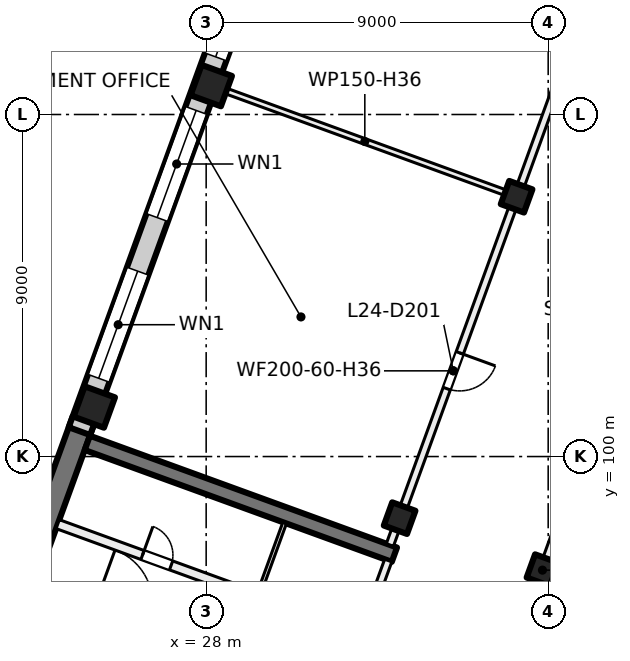
"""IFC4 building model, lengths in metres.
Left out: names, types, materials, properties, quantities, classifications, styles, units other than length and angle.
Written with IfcOpenShell. Run it as: python <this file> out.ifc"""

import sys

from ifc_helpers import new_model, si_unit, direction, frame, frame_2d, origin, origin_2d, place, context, subcontext, project, spatial, rectangle, extrude, element, fill, save


model = new_model("IFC4")
c1 = context("Model", 3, precision=1e-05, world=origin(), true_north=direction((0.0, 1.0)))
c2 = subcontext(c1, "Body", "Model", "MODEL_VIEW")
j1 = project(units=[si_unit("LENGTHUNIT", "METRE"), si_unit("PLANEANGLEUNIT", "RADIAN")], contexts=[c1])
p1 = place(None, origin())
s1 = spatial("IfcSite", under=j1, at=p1, CompositionType="ELEMENT")
p2 = place(p1, origin())
s2 = spatial("IfcBuilding", under=s1, at=p2, CompositionType="ELEMENT")
p3 = place(p2, frame((0.0, 0.0, 105.0)))
s3 = spatial("IfcBuildingStorey", under=s2, at=p3, CompositionType="ELEMENT", Elevation=105.0)
for number, where, z_axis, x_axis in (
    (1, (36.849, 97.011, 0.0), (0.0, 0.0, 1.0), (-0.342, -0.94, 0.0)),
    (2, (36.169, 106.836, 0.0), (0.0, 0.0, 1.0), (-0.342, -0.94, 0.0)),
    (3, (33.091, 98.379, 0.0), (0.0, 0.0, 1.0), (-0.342, -0.94, 0.0)),
):
    element("IfcColumn", number, at=place(p3, frame(where, z_axis=z_axis, x_axis=x_axis)), inside=s3, PredefinedType="COLUMN", context=c2, shape_type="SweptSolid", body=[
        extrude(rectangle(XDim=0.65, YDim=0.65, at=origin_2d()), origin(), (0.0, 0.0, 1.0), 4.0),
    ])
for number, where, z_axis, x_axis in (
    (4, (28.134, 109.76, 0.0), (0.0, 0.0, 1.0), (-0.342, -0.94, 0.0)),
    (5, (25.056, 101.303, 0.0), (0.0, 0.0, 1.0), (-0.342, -0.94, 0.0)),
):
    element("IfcColumn", number, at=place(p3, frame(where, z_axis=z_axis, x_axis=x_axis)), inside=s3, PredefinedType="COLUMN", context=c2, shape_type="SweptSolid", body=[
        extrude(rectangle(XDim=0.85, YDim=0.85, at=origin_2d()), origin(), (0.0, 0.0, 1.0), 4.0),
    ])
p4 = place(p3, frame((21.717, 92.568, 0.0), z_axis=(0.0, 0.0, 1.0), x_axis=(0.342017595281, 0.939693548195, 0.0)))
e6 = element("IfcWall", 6, at=p4, inside=s3, PredefinedType="SHEAR", context=c2, shape_type="SweptSolid", body=[
    extrude(rectangle(XDim=8.925, YDim=0.6, at=frame_2d((4.462, 0.0))), origin(), (0.0, 0.0, 1.0), 4.0),
])
p5 = place(p3, frame((32.953, 97.418, 0.0), z_axis=(0.0, 0.0, 1.0), x_axis=(-0.93969060187, 0.342025690201, 0.0)))
e7 = element("IfcWall", 7, at=p5, inside=s3, PredefinedType="SHEAR", context=c2, shape_type="SweptSolid", body=[
    extrude(rectangle(XDim=8.6, YDim=0.4, at=frame_2d((4.3, 0.0))), origin(), (0.0, 0.0, 1.0), 4.0),
])
p6 = place(p3, frame((24.666, 100.669, 0.0), z_axis=(0.0, 0.0, 1.0), x_axis=(0.34201964167, 0.939692803373, 0.0)))
e8 = element("IfcWall", 8, at=p6, inside=s3, PredefinedType="SOLIDWALL", context=c2, shape_type="SweptSolid", body=[
    extrude(rectangle(XDim=32.884, YDim=0.6, at=frame_2d((16.442, 0.0))), origin(), (0.0, 0.0, 1.0), 3.625),
])
p7 = place(p6, frame((1.48, 0.0, 0.9)))
e9 = element("IfcOpeningElement", 9, at=p7, cuts=e8, PredefinedType="OPENING", context=c2, shape_type="SweptSolid", body=[
    extrude(rectangle(XDim=3.0, YDim=2.4, at=frame_2d((1.5, 1.2))), frame((0.0, 0.31, 0.0), z_axis=(0.0, -1.0, 0.0), x_axis=(1.0, 0.0, 0.0)), (0.0, 0.0, 1.0), 0.62),
])
p8 = place(p6, frame((5.98, 0.0, 0.9)))
e10 = element("IfcOpeningElement", 10, at=p8, cuts=e8, PredefinedType="OPENING", context=c2, shape_type="SweptSolid", body=[
    extrude(rectangle(XDim=3.0, YDim=2.4, at=frame_2d((1.5, 1.2))), frame((0.0, 0.31, 0.0), z_axis=(0.0, -1.0, 0.0), x_axis=(1.0, 0.0, 0.0)), (0.0, 0.0, 1.0), 0.62),
])
p9 = place(p6, frame((10.48, 0.0, 0.9)))
e11 = element("IfcOpeningElement", 11, at=p9, cuts=e8, PredefinedType="OPENING", context=c2, shape_type="SweptSolid", body=[
    extrude(rectangle(XDim=3.0, YDim=2.4, at=frame_2d((1.5, 1.2))), frame((0.0, 0.31, 0.0), z_axis=(0.0, -1.0, 0.0), x_axis=(1.0, 0.0, 0.0)), (0.0, 0.0, 1.0), 0.62),
])
p10 = place(p6, frame((14.98, 0.0, 0.9)))
e12 = element("IfcOpeningElement", 12, at=p10, cuts=e8, PredefinedType="OPENING", context=c2, shape_type="SweptSolid", body=[
    extrude(rectangle(XDim=3.0, YDim=2.4, at=frame_2d((1.5, 1.2))), frame((0.0, 0.31, 0.0), z_axis=(0.0, -1.0, 0.0), x_axis=(1.0, 0.0, 0.0)), (0.0, 0.0, 1.0), 0.62),
])
p11 = place(p6, frame((19.48, 0.0, 0.9)))
e13 = element("IfcOpeningElement", 13, at=p11, cuts=e8, PredefinedType="OPENING", context=c2, shape_type="SweptSolid", body=[
    extrude(rectangle(XDim=3.0, YDim=2.4, at=frame_2d((1.5, 1.2))), frame((0.0, 0.31, 0.0), z_axis=(0.0, -1.0, 0.0), x_axis=(1.0, 0.0, 0.0)), (0.0, 0.0, 1.0), 0.62),
])
p12 = place(p6, frame((23.98, 0.0, 0.9)))
e14 = element("IfcOpeningElement", 14, at=p12, cuts=e8, PredefinedType="OPENING", context=c2, shape_type="SweptSolid", body=[
    extrude(rectangle(XDim=3.0, YDim=2.4, at=frame_2d((1.5, 1.2))), frame((0.0, 0.31, 0.0), z_axis=(0.0, -1.0, 0.0), x_axis=(1.0, 0.0, 0.0)), (0.0, 0.0, 1.0), 0.62),
])
p13 = place(p6, frame((28.48, 0.0, 0.9)))
e15 = element("IfcOpeningElement", 15, at=p13, cuts=e8, PredefinedType="OPENING", context=c2, shape_type="SweptSolid", body=[
    extrude(rectangle(XDim=3.0, YDim=2.4, at=frame_2d((1.5, 1.2))), frame((0.0, 0.31, 0.0), z_axis=(0.0, -1.0, 0.0), x_axis=(1.0, 0.0, 0.0)), (0.0, 0.0, 1.0), 0.62),
])
p14 = place(p3, frame((31.491, 93.693, 0.0), z_axis=(0.0, 0.0, 1.0), x_axis=(0.341995824804, 0.939701471648, 0.0)))
e16 = element("IfcWall", 16, at=p14, inside=s3, PredefinedType="PARTITIONING", context=c2, shape_type="SweptSolid", body=[
    extrude(rectangle(XDim=3.8, YDim=0.2, at=frame_2d((1.9, 0.0))), origin(), (0.0, 0.0, 1.0), 3.625),
])
p15 = place(p14, frame((0.3, 0.0, 0.0)))
e17 = element("IfcOpeningElement", 17, at=p15, cuts=e16, PredefinedType="OPENING", context=c2, shape_type="SweptSolid", body=[
    extrude(rectangle(XDim=1.2, YDim=2.1, at=frame_2d((0.6, 1.05))), frame((0.0, 0.11, 0.0), z_axis=(0.0, -1.0, 0.0), x_axis=(1.0, 0.0, 0.0)), (0.0, 0.0, 1.0), 0.22),
])
p16 = place(p3, frame((23.538, 96.694, 0.0), z_axis=(0.0, 0.0, 1.0), x_axis=(0.939691552312, -0.342023078919, 0.0)))
e18 = element("IfcWall", 18, at=p16, inside=s3, PredefinedType="PARTITIONING", context=c2, shape_type="SweptSolid", body=[
    extrude(rectangle(XDim=8.4, YDim=0.2, at=frame_2d((4.2, 0.0))), origin(), (0.0, 0.0, 1.0), 3.625),
])
p17 = place(p16, frame((1.65, 0.0, 0.0)))
e19 = element("IfcOpeningElement", 19, at=p17, cuts=e18, PredefinedType="OPENING", context=c2, shape_type="SweptSolid", body=[
    extrude(rectangle(XDim=1.5, YDim=2.1, at=frame_2d((0.75, 1.05))), frame((0.0, 0.11, 0.0), z_axis=(0.0, -1.0, 0.0), x_axis=(1.0, 0.0, 0.0)), (0.0, 0.0, 1.0), 0.22),
])
p18 = place(p3, frame((24.094, 98.221, 0.0), z_axis=(0.0, 0.0, 1.0), x_axis=(0.939691552312, -0.342023078919, 0.0)))
e20 = element("IfcWall", 20, at=p18, inside=s3, PredefinedType="PARTITIONING", context=c2, shape_type="SweptSolid", body=[
    extrude(rectangle(XDim=8.4, YDim=0.25, at=frame_2d((4.2, 0.0))), origin(), (0.0, 0.0, 1.0), 3.625),
])
p19 = place(p18, frame((6.625, 0.0, 0.0)))
e21 = element("IfcOpeningElement", 21, at=p19, cuts=e20, PredefinedType="OPENING", context=c2, shape_type="SweptSolid", body=[
    extrude(rectangle(XDim=0.8, YDim=2.1, at=frame_2d((0.4, 1.05))), frame((0.0, 0.135, 0.0), z_axis=(0.0, -1.0, 0.0), x_axis=(1.0, 0.0, 0.0)), (0.0, 0.0, 1.0), 0.27),
])
p20 = place(p18, frame((2.375, 0.0, 0.0)))
e22 = element("IfcOpeningElement", 22, at=p20, cuts=e20, PredefinedType="OPENING", context=c2, shape_type="SweptSolid", body=[
    extrude(rectangle(XDim=0.8, YDim=2.1, at=frame_2d((0.4, 1.05))), frame((0.0, 0.135, 0.0), z_axis=(0.0, -1.0, 0.0), x_axis=(1.0, 0.0, 0.0)), (0.0, 0.0, 1.0), 0.27),
])
p21 = place(p3, frame((29.399, 96.424, 0.0), z_axis=(0.0, 0.0, 1.0), x_axis=(0.341913947243, 0.939731266204, 0.0)))
e23 = element("IfcWall", 23, at=p21, inside=s3, PredefinedType="PARTITIONING", context=c2, shape_type="SweptSolid", body=[
    extrude(rectangle(XDim=1.95, YDim=0.1, at=frame_2d((0.975, 0.0))), origin(), (0.0, 0.0, 1.0), 3.625),
])
p22 = place(p3, frame((28.275, 109.709, 0.0), z_axis=(0.0, 0.0, 1.0), x_axis=(0.939697205528, -0.342007546586, 0.0)))
e24 = element("IfcWall", 24, at=p22, inside=s3, PredefinedType="PARTITIONING", context=c2, shape_type="SweptSolid", body=[
    extrude(rectangle(XDim=8.301, YDim=0.15, at=frame_2d((4.15, 0.0))), origin(), (0.0, 0.0, 1.0), 3.625),
])
p23 = place(p3, frame((32.834, 97.674, 0.0), z_axis=(0.0, 0.0, 1.0), x_axis=(0.342048644688, 0.939682246649, 0.0)))
e25 = element("IfcWall", 25, at=p23, inside=s3, PredefinedType="PARTITIONING", context=c2, shape_type="SweptSolid", body=[
    extrude(rectangle(XDim=9.75, YDim=0.2, at=frame_2d((4.875, 0.0))), origin(), (0.0, 0.0, 1.0), 3.625),
])
p24 = place(p23, frame((4.377, 0.0, 0.0)))
e26 = element("IfcOpeningElement", 26, at=p24, cuts=e25, PredefinedType="OPENING", context=c2, shape_type="SweptSolid", body=[
    extrude(rectangle(XDim=1.0, YDim=2.1, at=frame_2d((0.5, 1.05))), frame((0.0, 0.11, 0.0), z_axis=(0.0, -1.0, 0.0), x_axis=(1.0, 0.0, 0.0)), (0.0, 0.0, 1.0), 0.22),
])
p25 = place(p3, frame((36.169, 106.836, 0.0), z_axis=(0.0, 0.0, 1.0), x_axis=(0.341992433067, 0.939702706033, 0.0)))
e27 = element("IfcWall", 27, at=p25, inside=s3, PredefinedType="PARTITIONING", context=c2, shape_type="SweptSolid", body=[
    extrude(rectangle(XDim=18.0, YDim=0.2, at=frame_2d((9.0, 0.0))), origin(), (0.0, 0.0, 1.0), 3.625),
])
p26 = place(p25, frame((4.0, 0.0, 0.0)))
e28 = element("IfcOpeningElement", 28, at=p26, cuts=e27, PredefinedType="OPENING", context=c2, shape_type="SweptSolid", body=[
    extrude(rectangle(XDim=1.0, YDim=2.1, at=frame_2d((0.5, 1.05))), frame((0.0, 0.11, 0.0), z_axis=(0.0, -1.0, 0.0), x_axis=(1.0, 0.0, 0.0)), (0.0, 0.0, 1.0), 0.22),
])
p27 = place(p25, frame((13.821, 0.0, 0.0)))
e29 = element("IfcOpeningElement", 29, at=p27, cuts=e27, PredefinedType="OPENING", context=c2, shape_type="SweptSolid", body=[
    extrude(rectangle(XDim=1.0, YDim=2.1, at=frame_2d((0.5, 1.05))), frame((0.0, 0.11, 0.0), z_axis=(0.0, -1.0, 0.0), x_axis=(1.0, 0.0, 0.0)), (0.0, 0.0, 1.0), 0.22),
])
p28 = place(p3, frame((39.928, 105.468, 0.0), z_axis=(0.0, 0.0, 1.0), x_axis=(-0.34204059653, -0.939685176176, 0.0)))
e30 = element("IfcWall", 30, at=p28, inside=s3, PredefinedType="PARTITIONING", context=c2, shape_type="SweptSolid", body=[
    extrude(rectangle(XDim=9.75, YDim=0.2, at=frame_2d((4.875, 0.0))), origin(), (0.0, 0.0, 1.0), 3.625),
])
p29 = place(p28, frame((4.373, 0.0, 0.0)))
e31 = element("IfcOpeningElement", 31, at=p29, cuts=e30, PredefinedType="OPENING", context=c2, shape_type="SweptSolid", body=[
    extrude(rectangle(XDim=1.0, YDim=2.1, at=frame_2d((0.5, 1.05))), frame((0.0, 0.11, 0.0), z_axis=(0.0, -1.0, 0.0), x_axis=(1.0, 0.0, 0.0)), (0.0, 0.0, 1.0), 0.22),
])
p30 = place(p7, origin())
e32 = element("IfcWindow", 32, at=p30, inside=s3, PartitioningType="SINGLE_PANEL", PredefinedType="WINDOW", context=c2, shape_type="SweptSolid", body=[
    extrude(rectangle(XDim=3.0, YDim=2.4, at=frame_2d((1.5, 1.2))), frame((0.0, 0.03, 0.0), z_axis=(0.0, -1.0, 0.0), x_axis=(1.0, 0.0, 0.0)), (0.0, 0.0, 1.0), 0.06),
])
fill(e9, e32)
p31 = place(p8, origin())
e33 = element("IfcWindow", 33, at=p31, inside=s3, PartitioningType="SINGLE_PANEL", PredefinedType="WINDOW", context=c2, shape_type="SweptSolid", body=[
    extrude(rectangle(XDim=3.0, YDim=2.4, at=frame_2d((1.5, 1.2))), frame((0.0, 0.03, 0.0), z_axis=(0.0, -1.0, 0.0), x_axis=(1.0, 0.0, 0.0)), (0.0, 0.0, 1.0), 0.06),
])
fill(e10, e33)
p32 = place(p9, origin())
e34 = element("IfcWindow", 34, at=p32, inside=s3, PartitioningType="SINGLE_PANEL", PredefinedType="WINDOW", context=c2, shape_type="SweptSolid", body=[
    extrude(rectangle(XDim=3.0, YDim=2.4, at=frame_2d((1.5, 1.2))), frame((0.0, 0.03, 0.0), z_axis=(0.0, -1.0, 0.0), x_axis=(1.0, 0.0, 0.0)), (0.0, 0.0, 1.0), 0.06),
])
fill(e11, e34)
p33 = place(p20, origin())
e35 = element("IfcDoor", 35, at=p33, inside=s3, OperationType="SINGLE_SWING_RIGHT", PredefinedType="DOOR", context=c2, shape_type="SweptSolid", body=[
    extrude(rectangle(XDim=0.8, YDim=2.1, at=frame_2d((0.4, 1.05))), frame((0.0, 0.025, 0.0), z_axis=(0.0, -1.0, 0.0), x_axis=(1.0, 0.0, 0.0)), (0.0, 0.0, 1.0), 0.05),
])
fill(e22, e35)
p34 = place(p24, origin())
e36 = element("IfcDoor", 36, at=p34, inside=s3, OperationType="SINGLE_SWING_RIGHT", PredefinedType="DOOR", context=c2, shape_type="SweptSolid", body=[
    extrude(rectangle(XDim=1.0, YDim=2.1, at=frame_2d((0.5, 1.05))), frame((0.0, 0.025, 0.0), z_axis=(0.0, -1.0, 0.0), x_axis=(1.0, 0.0, 0.0)), (0.0, 0.0, 1.0), 0.05),
])
fill(e26, e36)
save(model, sys.argv[1])
